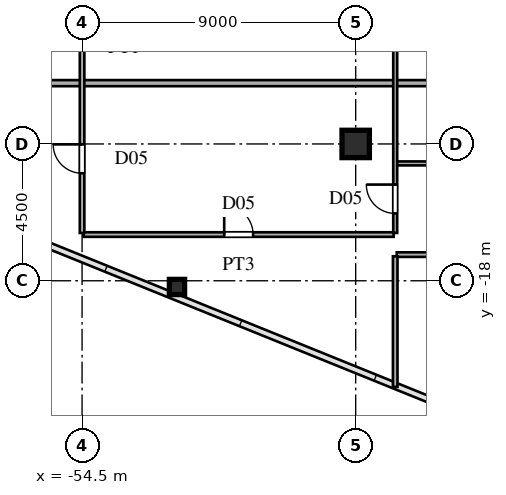
"""IFC4 building model, lengths in metres.
Left out: names, types, materials, properties, quantities, classifications, styles, units other than length and angle.
Written with IfcOpenShell. Run it as: python <this file> out.ifc"""

import sys

from ifc_helpers import new_model, si_unit, direction, frame, frame_2d, origin, origin_2d, place, context, subcontext, project, spatial, rectangle, hollow_rectangle, i_section, extrude, source, transform, mapped, element, fill, save


model = new_model("IFC4")
c1 = context("Model", 3, precision=1e-05, world=origin(), true_north=direction((0.0, 1.0)))
c2 = subcontext(c1, "Body", "Model", "MODEL_VIEW")
j1 = project(units=[si_unit("LENGTHUNIT", "METRE"), si_unit("PLANEANGLEUNIT", "RADIAN")], contexts=[c1])
p1 = place(None, origin())
s1 = spatial("IfcSite", under=j1, at=p1, CompositionType="ELEMENT")
p2 = place(p1, origin())
s2 = spatial("IfcBuilding", under=s1, at=p2, CompositionType="ELEMENT")
p3 = place(p2, frame((0.0, 0.0, 29.7)))
s3 = spatial("IfcBuildingStorey", under=s2, at=p3, CompositionType="ELEMENT", Elevation=29.7)
m1 = source(origin(), c2, "Body", "SweptSolid", [
    extrude(i_section(OverallWidth=0.9, OverallDepth=0.9, WebThickness=0.036, FlangeThickness=0.055, at=origin_2d()), origin(), (0.0, 0.0, 1.0), 3.6),
])
p4 = place(p3, frame((-45.5, -13.5, 0.0), z_axis=(0.0, 0.0, 1.0), x_axis=(1.0, 0.0, 0.0)))
e1 = element("IfcColumn", 1, at=p4, inside=s3, PredefinedType="COLUMN", context=c2, shape_type="MappedRepresentation", body=[
    mapped(m1, transform((0.0, 0.0, 0.0), scale=1.0)),
])
m2 = source(origin(), c2, "Body", "SweptSolid", [
    extrude(hollow_rectangle(XDim=0.5, YDim=0.5, WallThickness=0.02, at=origin_2d()), origin(), (0.0, 0.0, 1.0), 3.6),
])
p5 = place(p3, frame((-51.378, -18.204, 0.0), z_axis=(0.0, 0.0, 1.0), x_axis=(1.0, 0.0, 0.0)))
e2 = element("IfcColumn", 2, at=p5, inside=s3, PredefinedType="COLUMN", context=c2, shape_type="MappedRepresentation", body=[
    mapped(m2, transform((0.0, 0.0, 0.0), scale=1.0)),
])
p6 = place(p3, frame((-44.15, -17.14, 0.0), z_axis=(0.0, 0.0, 1.0), x_axis=(1.0, 0.0, 0.0)))
e3 = element("IfcWall", 3, at=p6, inside=s3, PredefinedType="PARTITIONING", context=c2, shape_type="SweptSolid", body=[
    extrude(rectangle(XDim=4.5, YDim=0.15, at=frame_2d((2.25, 0.0))), origin(), (0.0, 0.0, 1.0), 3.38),
])
p7 = place(p6, frame((1.775, 0.0, 0.0)))
e4 = element("IfcOpeningElement", 4, at=p7, cuts=e3, PredefinedType="OPENING", context=c2, shape_type="SweptSolid", body=[
    extrude(rectangle(XDim=0.95, YDim=2.15, at=frame_2d((0.475, 1.075))), frame((0.0, 0.085, 0.0), z_axis=(0.0, -1.0, 0.0), x_axis=(1.0, 0.0, 0.0)), (0.0, 0.0, 1.0), 0.17),
])
p8 = place(p3, frame((-54.45, -16.48, 0.0), z_axis=(0.0, 0.0, 1.0), x_axis=(1.0, 0.0, 0.0)))
e5 = element("IfcWall", 5, at=p8, inside=s3, PredefinedType="PARTITIONING", context=c2, shape_type="SweptSolid", body=[
    extrude(rectangle(XDim=10.2, YDim=0.15, at=frame_2d((5.1, 0.0))), origin(), (0.0, 0.0, 1.0), 3.38),
])
p9 = place(p8, frame((4.625, 0.0, 0.0)))
e6 = element("IfcOpeningElement", 6, at=p9, cuts=e5, PredefinedType="OPENING", context=c2, shape_type="SweptSolid", body=[
    extrude(rectangle(XDim=0.95, YDim=2.15, at=frame_2d((0.475, 1.075))), frame((0.0, 0.085, 0.0), z_axis=(0.0, -1.0, 0.0), x_axis=(1.0, 0.0, 0.0)), (0.0, 0.0, 1.0), 0.17),
])
p10 = place(p3, frame((-44.15, -14.14, 0.0), z_axis=(0.0, 0.0, 1.0), x_axis=(1.0, 0.0, 0.0)))
e7 = element("IfcWall", 7, at=p10, inside=s3, PredefinedType="PARTITIONING", context=c2, shape_type="SweptSolid", body=[
    extrude(rectangle(XDim=4.45, YDim=0.13, at=frame_2d((2.225, 0.0))), origin(), (0.0, 0.0, 1.0), 3.38),
])
p11 = place(p10, frame((1.785, 0.0, 0.0)))
e8 = element("IfcOpeningElement", 8, at=p11, cuts=e7, PredefinedType="OPENING", context=c2, shape_type="SweptSolid", body=[
    extrude(rectangle(XDim=0.88, YDim=2.1, at=frame_2d((0.44, 1.05))), frame((0.0, 0.075, 0.0), z_axis=(0.0, -1.0, 0.0), x_axis=(1.0, 0.0, 0.0)), (0.0, 0.0, 1.0), 0.15),
])
p12 = place(p3, frame((-68.807, -11.5, 0.0), z_axis=(0.0, 0.0, 1.0), x_axis=(1.0, 0.0, 0.0)))
e9 = element("IfcWall", 9, at=p12, inside=s3, PredefinedType="PARTITIONING", context=c2, shape_type="SweptSolid", body=[
    extrude(rectangle(XDim=29.077, YDim=0.2, at=frame_2d((14.539, 0.0))), origin(), (0.0, 0.0, 1.0), 3.38),
])
p13 = place(p3, frame((-54.5, -16.427, 0.0), z_axis=(0.0, 0.0, 1.0), x_axis=(0.0, 1.0, 0.0)))
e10 = element("IfcWall", 10, at=p13, inside=s3, PredefinedType="PARTITIONING", context=c2, shape_type="SweptSolid", body=[
    extrude(rectangle(XDim=32.854, YDim=0.15, at=frame_2d((16.427, 0.0))), origin(), (0.0, 0.0, 1.0), 2.68),
])
p14 = place(p13, frame((1.963, 0.0, 0.0)))
e11 = element("IfcOpeningElement", 11, at=p14, cuts=e10, PredefinedType="OPENING", context=c2, shape_type="SweptSolid", body=[
    extrude(rectangle(XDim=0.95, YDim=2.15, at=frame_2d((0.475, 1.075))), frame((0.0, 0.085, 0.0), z_axis=(0.0, -1.0, 0.0), x_axis=(1.0, 0.0, 0.0)), (0.0, 0.0, 1.0), 0.17),
])
p15 = place(p13, frame((10.47, 0.0, 0.0)))
e12 = element("IfcOpeningElement", 12, at=p15, cuts=e10, PredefinedType="OPENING", context=c2, shape_type="SweptSolid", body=[
    extrude(rectangle(XDim=0.95, YDim=2.15, at=frame_2d((0.475, 1.075))), frame((0.0, 0.085, 0.0), z_axis=(0.0, -1.0, 0.0), x_axis=(1.0, 0.0, 0.0)), (0.0, 0.0, 1.0), 0.17),
])
p16 = place(p13, frame((19.504, 0.0, 0.0)))
e13 = element("IfcOpeningElement", 13, at=p16, cuts=e10, PredefinedType="OPENING", context=c2, shape_type="SweptSolid", body=[
    extrude(rectangle(XDim=0.95, YDim=2.15, at=frame_2d((0.475, 1.075))), frame((0.0, 0.085, 0.0), z_axis=(0.0, -1.0, 0.0), x_axis=(1.0, 0.0, 0.0)), (0.0, 0.0, 1.0), 0.17),
])
p17 = place(p13, frame((29.941, 0.0, 0.0)))
e14 = element("IfcOpeningElement", 14, at=p17, cuts=e10, PredefinedType="OPENING", context=c2, shape_type="SweptSolid", body=[
    extrude(rectangle(XDim=0.95, YDim=2.15, at=frame_2d((0.475, 1.075))), frame((0.0, 0.085, 0.0), z_axis=(0.0, -1.0, 0.0), x_axis=(1.0, 0.0, 0.0)), (0.0, 0.0, 1.0), 0.17),
])
p18 = place(p3, frame((-44.2, -21.49, 0.0), z_axis=(0.0, 0.0, 1.0), x_axis=(0.0, 1.0, 0.0)))
e15 = element("IfcWall", 15, at=p18, inside=s3, PredefinedType="PARTITIONING", context=c2, shape_type="SweptSolid", body=[
    extrude(rectangle(XDim=4.295, YDim=0.15, at=frame_2d((2.147, 0.0))), origin(), (0.0, 0.0, 1.0), 3.38),
])
p19 = place(p3, frame((-44.2, -16.427, 0.0), z_axis=(0.0, 0.0, 1.0), x_axis=(0.0, 1.0, 0.0)))
e16 = element("IfcWall", 16, at=p19, inside=s3, PredefinedType="PARTITIONING", context=c2, shape_type="SweptSolid", body=[
    extrude(rectangle(XDim=13.877, YDim=0.13, at=frame_2d((6.938, 0.0))), origin(), (0.0, 0.0, 1.0), 3.38),
])
p20 = place(p19, frame((0.641, 0.0, 0.0)))
e17 = element("IfcOpeningElement", 17, at=p20, cuts=e16, PredefinedType="OPENING", context=c2, shape_type="SweptSolid", body=[
    extrude(rectangle(XDim=0.95, YDim=2.15, at=frame_2d((0.475, 1.075))), frame((0.0, 0.075, 0.0), z_axis=(0.0, -1.0, 0.0), x_axis=(1.0, 0.0, 0.0)), (0.0, 0.0, 1.0), 0.15),
])
p21 = place(p19, frame((10.454, 0.0, 0.0)))
e18 = element("IfcOpeningElement", 18, at=p21, cuts=e16, PredefinedType="OPENING", context=c2, shape_type="SweptSolid", body=[
    extrude(rectangle(XDim=0.95, YDim=2.15, at=frame_2d((0.475, 1.075))), frame((0.0, 0.075, 0.0), z_axis=(0.0, -1.0, 0.0), x_axis=(1.0, 0.0, 0.0)), (0.0, 0.0, 1.0), 0.15),
])
m3 = source(origin(), c2, "Body", "SweptSolid", [
    extrude(rectangle(XDim=0.95, YDim=2.15, at=frame_2d((0.475, 1.075))), frame((0.0, 0.025, 0.0), z_axis=(0.0, -1.0, 0.0), x_axis=(1.0, 0.0, 0.0)), (0.0, 0.0, 1.0), 0.05),
])
p22 = place(p9, origin())
e19 = element("IfcDoor", 19, at=p22, inside=s3, OperationType="SINGLE_SWING_LEFT", PredefinedType="DOOR", context=c2, shape_type="MappedRepresentation", body=[
    mapped(m3, transform((0.0, 0.0, 0.0), scale=1.0)),
])
fill(e6, e19)
p23 = place(p14, origin())
e20 = element("IfcDoor", 20, at=p23, inside=s3, OperationType="SINGLE_SWING_RIGHT", PredefinedType="DOOR", context=c2, shape_type="MappedRepresentation", body=[
    mapped(m3, transform((0.0, 0.0, 0.0), scale=1.0)),
])
fill(e11, e20)
p24 = place(p20, origin())
e21 = element("IfcDoor", 21, at=p24, inside=s3, OperationType="SINGLE_SWING_RIGHT", PredefinedType="DOOR", context=c2, shape_type="MappedRepresentation", body=[
    mapped(m3, transform((0.0, 0.0, 0.0), scale=1.0)),
])
fill(e17, e21)
save(model, sys.argv[1])
